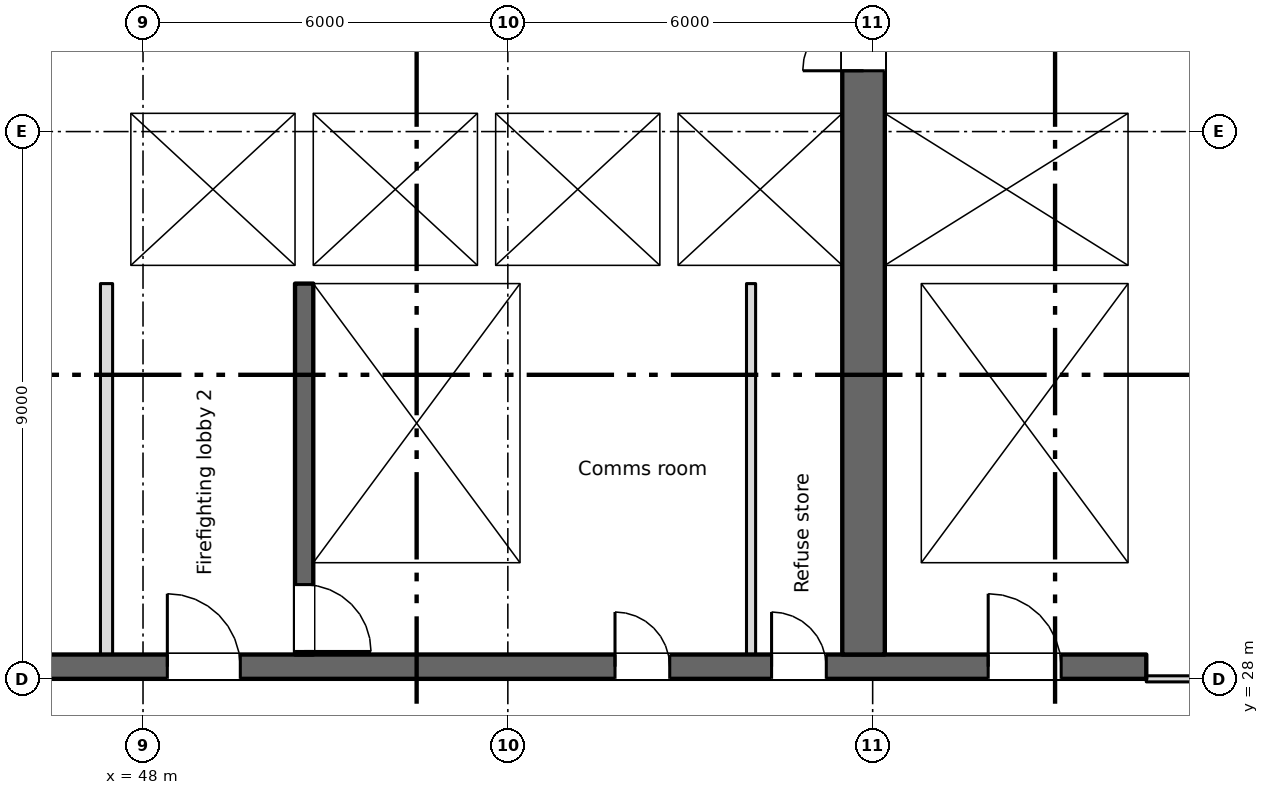
"""IFC4 building model, lengths in metres.
Left out: names, types, materials, properties, quantities, classifications, styles, units other than length and angle.
Written with IfcOpenShell. Run it as: python <this file> out.ifc"""

import sys

from ifc_helpers import new_model, si_unit, direction, frame, frame_2d, origin, place, context, subcontext, project, spatial, rectangle, extrude, element, fill, save


model = new_model("IFC4")
c1 = context("Model", 3, precision=1e-05, world=origin(), true_north=direction((0.0, 1.0)))
c2 = subcontext(c1, "Body", "Model", "MODEL_VIEW")
j1 = project(units=[si_unit("LENGTHUNIT", "METRE"), si_unit("PLANEANGLEUNIT", "RADIAN")], contexts=[c1])
p1 = place(None, origin())
s1 = spatial("IfcSite", under=j1, at=p1, CompositionType="ELEMENT")
p2 = place(p1, origin())
s2 = spatial("IfcBuilding", under=s1, at=p2, CompositionType="ELEMENT")
p3 = place(p2, frame((0.0, 0.0, 170.5)))
s3 = spatial("IfcBuildingStorey", under=s2, at=p3, CompositionType="ELEMENT", Elevation=170.5)
p4 = place(p3, frame((6.6, 28.2, 0.0), z_axis=(0.0, 0.0, 1.0), x_axis=(1.0, 0.0, 0.0)))
e1 = element("IfcWall", 1, at=p4, inside=s3, PredefinedType="SHEAR", context=c2, shape_type="SweptSolid", body=[
    extrude(rectangle(XDim=57.9, YDim=0.4, at=frame_2d((28.95, 0.0))), origin(), (0.0, 0.0, 1.0), 3.35),
])
p5 = place(p4, frame((12.163, 0.0, 0.0)))
e2 = element("IfcOpeningElement", 2, at=p5, cuts=e1, PredefinedType="OPENING", context=c2, shape_type="SweptSolid", body=[
    extrude(rectangle(XDim=0.9, YDim=2.1, at=frame_2d((0.45, 1.05))), frame((0.0, 0.21, 0.0), z_axis=(0.0, -1.0, 0.0), x_axis=(1.0, 0.0, 0.0)), (0.0, 0.0, 1.0), 0.42),
])
p6 = place(p4, frame((14.738, 0.0, 0.0)))
e3 = element("IfcOpeningElement", 3, at=p6, cuts=e1, PredefinedType="OPENING", context=c2, shape_type="SweptSolid", body=[
    extrude(rectangle(XDim=0.9, YDim=2.1, at=frame_2d((0.45, 1.05))), frame((0.0, 0.21, 0.0), z_axis=(0.0, -1.0, 0.0), x_axis=(1.0, 0.0, 0.0)), (0.0, 0.0, 1.0), 0.42),
])
p7 = place(p4, frame((49.163, 0.0, 0.0)))
e4 = element("IfcOpeningElement", 4, at=p7, cuts=e1, PredefinedType="OPENING", context=c2, shape_type="SweptSolid", body=[
    extrude(rectangle(XDim=0.9, YDim=2.1, at=frame_2d((0.45, 1.05))), frame((0.0, 0.21, 0.0), z_axis=(0.0, -1.0, 0.0), x_axis=(1.0, 0.0, 0.0)), (0.0, 0.0, 1.0), 0.42),
])
p8 = place(p4, frame((51.738, 0.0, 0.0)))
e5 = element("IfcOpeningElement", 5, at=p8, cuts=e1, PredefinedType="OPENING", context=c2, shape_type="SweptSolid", body=[
    extrude(rectangle(XDim=0.9, YDim=2.1, at=frame_2d((0.45, 1.05))), frame((0.0, 0.21, 0.0), z_axis=(0.0, -1.0, 0.0), x_axis=(1.0, 0.0, 0.0)), (0.0, 0.0, 1.0), 0.42),
])
p9 = place(p4, frame((1.45, 0.0, 0.0)))
e6 = element("IfcOpeningElement", 6, at=p9, cuts=e1, PredefinedType="OPENING", context=c2, shape_type="SweptSolid", body=[
    extrude(rectangle(XDim=0.9, YDim=2.1, at=frame_2d((0.45, 1.05))), frame((0.0, 0.21, 0.0), z_axis=(0.0, -1.0, 0.0), x_axis=(1.0, 0.0, 0.0)), (0.0, 0.0, 1.0), 0.42),
])
p10 = place(p4, frame((4.8, 0.0, 0.0)))
e7 = element("IfcOpeningElement", 7, at=p10, cuts=e1, PredefinedType="OPENING", context=c2, shape_type="SweptSolid", body=[
    extrude(rectangle(XDim=1.2, YDim=2.1, at=frame_2d((0.6, 1.05))), frame((0.0, 0.21, 0.0), z_axis=(0.0, -1.0, 0.0), x_axis=(1.0, 0.0, 0.0)), (0.0, 0.0, 1.0), 0.42),
])
p11 = place(p4, frame((31.8, 0.0, 0.0)))
e8 = element("IfcOpeningElement", 8, at=p11, cuts=e1, PredefinedType="OPENING", context=c2, shape_type="SweptSolid", body=[
    extrude(rectangle(XDim=1.2, YDim=2.1, at=frame_2d((0.6, 1.05))), frame((0.0, 0.21, 0.0), z_axis=(0.0, -1.0, 0.0), x_axis=(1.0, 0.0, 0.0)), (0.0, 0.0, 1.0), 0.42),
])
p12 = place(p4, frame((55.3, 0.0, 0.0)))
e9 = element("IfcOpeningElement", 9, at=p12, cuts=e1, PredefinedType="OPENING", context=c2, shape_type="SweptSolid", body=[
    extrude(rectangle(XDim=1.2, YDim=2.1, at=frame_2d((0.6, 1.05))), frame((0.0, 0.21, 0.0), z_axis=(0.0, -1.0, 0.0), x_axis=(1.0, 0.0, 0.0)), (0.0, 0.0, 1.0), 0.42),
])
p13 = place(p4, frame((21.8, 0.0, 0.0)))
e10 = element("IfcOpeningElement", 10, at=p13, cuts=e1, PredefinedType="OPENING", context=c2, shape_type="SweptSolid", body=[
    extrude(rectangle(XDim=1.2, YDim=2.1, at=frame_2d((0.6, 1.05))), frame((0.0, 0.21, 0.0), z_axis=(0.0, -1.0, 0.0), x_axis=(1.0, 0.0, 0.0)), (0.0, 0.0, 1.0), 0.42),
])
p14 = place(p4, frame((41.8, 0.0, 0.0)))
e11 = element("IfcOpeningElement", 11, at=p14, cuts=e1, PredefinedType="OPENING", context=c2, shape_type="SweptSolid", body=[
    extrude(rectangle(XDim=1.2, YDim=2.1, at=frame_2d((0.6, 1.05))), frame((0.0, 0.21, 0.0), z_axis=(0.0, -1.0, 0.0), x_axis=(1.0, 0.0, 0.0)), (0.0, 0.0, 1.0), 0.42),
])
p15 = place(p4, frame((24.95, 0.0, 0.0)))
e12 = element("IfcOpeningElement", 12, at=p15, cuts=e1, PredefinedType="OPENING", context=c2, shape_type="SweptSolid", body=[
    extrude(rectangle(XDim=2.4, YDim=2.1, at=frame_2d((1.2, 1.05))), frame((0.0, 0.21, 0.0), z_axis=(0.0, -1.0, 0.0), x_axis=(1.0, 0.0, 0.0)), (0.0, 0.0, 1.0), 0.42),
])
p16 = place(p4, frame((37.45, 0.0, 0.0)))
e13 = element("IfcOpeningElement", 13, at=p16, cuts=e1, PredefinedType="OPENING", context=c2, shape_type="SweptSolid", body=[
    extrude(rectangle(XDim=2.4, YDim=2.1, at=frame_2d((1.2, 1.05))), frame((0.0, 0.21, 0.0), z_axis=(0.0, -1.0, 0.0), x_axis=(1.0, 0.0, 0.0)), (0.0, 0.0, 1.0), 0.42),
])
p17 = place(p4, frame((8.1, 0.0, 0.0)))
e14 = element("IfcOpeningElement", 14, at=p17, cuts=e1, PredefinedType="OPENING", context=c2, shape_type="SweptSolid", body=[
    extrude(rectangle(XDim=2.4, YDim=2.1, at=frame_2d((1.2, 1.05))), frame((0.0, 0.21, 0.0), z_axis=(0.0, -1.0, 0.0), x_axis=(1.0, 0.0, 0.0)), (0.0, 0.0, 1.0), 0.42),
])
p18 = place(p4, frame((28.95, 0.0, 0.0)))
e15 = element("IfcOpeningElement", 15, at=p18, cuts=e1, PredefinedType="OPENING", context=c2, shape_type="SweptSolid", body=[
    extrude(rectangle(XDim=0.9, YDim=2.1, at=frame_2d((0.45, 1.05))), frame((0.0, 0.21, 0.0), z_axis=(0.0, -1.0, 0.0), x_axis=(1.0, 0.0, 0.0)), (0.0, 0.0, 1.0), 0.42),
])
p19 = place(p4, frame((34.95, 0.0, 0.0)))
e16 = element("IfcOpeningElement", 16, at=p19, cuts=e1, PredefinedType="OPENING", context=c2, shape_type="SweptSolid", body=[
    extrude(rectangle(XDim=0.9, YDim=2.1, at=frame_2d((0.45, 1.05))), frame((0.0, 0.21, 0.0), z_axis=(0.0, -1.0, 0.0), x_axis=(1.0, 0.0, 0.0)), (0.0, 0.0, 1.0), 0.42),
])
p20 = place(p3, frame((64.35, 34.8, 0.0), z_axis=(0.0, 0.0, 1.0), x_axis=(0.0, 1.0, 0.0)))
e17 = element("IfcWall", 17, at=p20, inside=s3, PredefinedType="SHEAR", context=c2, shape_type="SweptSolid", body=[
    extrude(rectangle(XDim=10.5, YDim=0.3, at=frame_2d((5.25, 0.0))), origin(), (0.0, 0.0, 1.0), 3.35),
])
p21 = place(p3, frame((59.85, 28.4, 0.0), z_axis=(0.0, 0.0, 1.0), x_axis=(0.0, 1.0, 0.0)))
e18 = element("IfcWall", 18, at=p21, inside=s3, PredefinedType="SHEAR", context=c2, shape_type="SweptSolid", body=[
    extrude(rectangle(XDim=16.9, YDim=0.7, at=frame_2d((8.45, 0.0))), origin(), (0.0, 0.0, 1.0), 3.35),
])
p22 = place(p21, frame((9.6, 0.0, 0.0)))
e19 = element("IfcOpeningElement", 19, at=p22, cuts=e18, PredefinedType="OPENING", context=c2, shape_type="SweptSolid", body=[
    extrude(rectangle(XDim=2.0, YDim=2.1, at=frame_2d((1.0, 1.05))), frame((0.0, 0.36, 0.0), z_axis=(0.0, -1.0, 0.0), x_axis=(1.0, 0.0, 0.0)), (0.0, 0.0, 1.0), 0.72),
])
p23 = place(p21, frame((15.4, 0.0, 0.0)))
e20 = element("IfcOpeningElement", 20, at=p23, cuts=e18, PredefinedType="OPENING", context=c2, shape_type="SweptSolid", body=[
    extrude(rectangle(XDim=1.2, YDim=2.1, at=frame_2d((0.6, 1.05))), frame((0.0, 0.36, 0.0), z_axis=(0.0, -1.0, 0.0), x_axis=(1.0, 0.0, 0.0)), (0.0, 0.0, 1.0), 0.72),
])
p24 = place(p3, frame((50.65, 34.5, 0.0), z_axis=(0.0, 0.0, 1.0), x_axis=(0.0, -1.0, 0.0)))
e21 = element("IfcWall", 21, at=p24, inside=s3, PredefinedType="SHEAR", context=c2, shape_type="SweptSolid", body=[
    extrude(rectangle(XDim=6.1, YDim=0.3, at=frame_2d((3.05, 0.0))), origin(), (0.0, 0.0, 1.0), 3.35),
])
p25 = place(p24, frame((4.95, 0.0, 0.0)))
e22 = element("IfcOpeningElement", 22, at=p25, cuts=e21, PredefinedType="OPENING", context=c2, shape_type="SweptSolid", body=[
    extrude(rectangle(XDim=1.1, YDim=2.1, at=frame_2d((0.55, 1.05))), frame((0.0, 0.16, 0.0), z_axis=(0.0, -1.0, 0.0), x_axis=(1.0, 0.0, 0.0)), (0.0, 0.0, 1.0), 0.32),
])
p26 = place(p3, frame((54.35, 28.4, 0.0), z_axis=(0.0, 0.0, 1.0), x_axis=(0.0, 1.0, 0.0)))
e23 = element("IfcWall", 23, at=p26, inside=s3, PredefinedType="SHEAR", context=c2, shape_type="SweptSolid", body=[
    extrude(rectangle(XDim=6.1, YDim=0.3, at=frame_2d((3.05, 0.0))), origin(), (0.0, 0.0, 1.0), 3.35),
])
p27 = place(p3, frame((60.5, 28.4, 0.0), z_axis=(0.0, 0.0, 1.0), x_axis=(0.0, 1.0, 0.0)))
e24 = element("IfcWall", 24, at=p27, inside=s3, PredefinedType="SHEAR", context=c2, shape_type="SweptSolid", body=[
    extrude(rectangle(XDim=6.1, YDim=0.6, at=frame_2d((3.05, 0.0))), origin(), (0.0, 0.0, 1.0), 3.35),
])
p28 = place(p3, frame((64.35, 28.4, 0.0), z_axis=(0.0, 0.0, 1.0), x_axis=(0.0, 1.0, 0.0)))
e25 = element("IfcWall", 25, at=p28, inside=s3, PredefinedType="SHEAR", context=c2, shape_type="SweptSolid", body=[
    extrude(rectangle(XDim=6.1, YDim=0.3, at=frame_2d((3.05, 0.0))), origin(), (0.0, 0.0, 1.0), 3.35),
])
p29 = place(p3, frame((47.3, 34.65, 0.0), z_axis=(0.0, 0.0, 1.0), x_axis=(1.0, 0.0, 0.0)))
e26 = element("IfcWall", 26, at=p29, inside=s3, PredefinedType="SHEAR", context=c2, shape_type="SweptSolid", body=[
    extrude(rectangle(XDim=12.2, YDim=0.3, at=frame_2d((6.1, 0.0))), origin(), (0.0, 0.0, 1.0), 3.35),
])
p30 = place(p29, frame((1.3, 0.0, 0.0)))
e27 = element("IfcOpeningElement", 27, at=p30, cuts=e26, PredefinedType="OPENING", context=c2, shape_type="SweptSolid", body=[
    extrude(rectangle(XDim=1.1, YDim=2.1, at=frame_2d((0.55, 1.05))), frame((0.0, 0.16, 0.0), z_axis=(0.0, -1.0, 0.0), x_axis=(1.0, 0.0, 0.0)), (0.0, 0.0, 1.0), 0.32),
])
p31 = place(p3, frame((60.2, 34.65, 0.0), z_axis=(0.0, 0.0, 1.0), x_axis=(1.0, 0.0, 0.0)))
e28 = element("IfcWall", 28, at=p31, inside=s3, PredefinedType="SHEAR", context=c2, shape_type="SweptSolid", body=[
    extrude(rectangle(XDim=4.3, YDim=0.3, at=frame_2d((2.15, 0.0))), origin(), (0.0, 0.0, 1.0), 3.35),
])
p32 = place(p3, frame((47.3, 37.45, 0.0), z_axis=(0.0, 0.0, 1.0), x_axis=(1.0, 0.0, 0.0)))
e29 = element("IfcWall", 29, at=p32, inside=s3, PredefinedType="SHEAR", context=c2, shape_type="SweptSolid", body=[
    extrude(rectangle(XDim=12.2, YDim=0.3, at=frame_2d((6.1, 0.0))), origin(), (0.0, 0.0, 1.0), 3.35),
])
p33 = place(p32, frame((4.3, 0.0, 0.0)))
e30 = element("IfcOpeningElement", 30, at=p33, cuts=e29, PredefinedType="OPENING", context=c2, shape_type="SweptSolid", body=[
    extrude(rectangle(XDim=1.1, YDim=2.1, at=frame_2d((0.55, 1.05))), frame((0.0, 0.16, 0.0), z_axis=(0.0, -1.0, 0.0), x_axis=(1.0, 0.0, 0.0)), (0.0, 0.0, 1.0), 0.32),
])
p34 = place(p32, frame((7.3, 0.0, 0.0)))
e31 = element("IfcOpeningElement", 31, at=p34, cuts=e29, PredefinedType="OPENING", context=c2, shape_type="SweptSolid", body=[
    extrude(rectangle(XDim=1.1, YDim=2.1, at=frame_2d((0.55, 1.05))), frame((0.0, 0.16, 0.0), z_axis=(0.0, -1.0, 0.0), x_axis=(1.0, 0.0, 0.0)), (0.0, 0.0, 1.0), 0.32),
])
p35 = place(p32, frame((10.3, 0.0, 0.0)))
e32 = element("IfcOpeningElement", 32, at=p35, cuts=e29, PredefinedType="OPENING", context=c2, shape_type="SweptSolid", body=[
    extrude(rectangle(XDim=1.1, YDim=2.1, at=frame_2d((0.55, 1.05))), frame((0.0, 0.16, 0.0), z_axis=(0.0, -1.0, 0.0), x_axis=(1.0, 0.0, 0.0)), (0.0, 0.0, 1.0), 0.32),
])
p36 = place(p3, frame((60.2, 37.45, 0.0), z_axis=(0.0, 0.0, 1.0), x_axis=(1.0, 0.0, 0.0)))
e33 = element("IfcWall", 33, at=p36, inside=s3, PredefinedType="SHEAR", context=c2, shape_type="SweptSolid", body=[
    extrude(rectangle(XDim=4.0, YDim=0.3, at=frame_2d((2.0, 0.0))), origin(), (0.0, 0.0, 1.0), 3.35),
])
p37 = place(p36, frame((1.45, 0.0, 0.0)))
e34 = element("IfcOpeningElement", 34, at=p37, cuts=e33, PredefinedType="OPENING", context=c2, shape_type="SweptSolid", body=[
    extrude(rectangle(XDim=1.1, YDim=2.1, at=frame_2d((0.55, 1.05))), frame((0.0, 0.16, 0.0), z_axis=(0.0, -1.0, 0.0), x_axis=(1.0, 0.0, 0.0)), (0.0, 0.0, 1.0), 0.32),
])
p38 = place(p3, frame((47.55, 34.8, 0.0), z_axis=(0.0, 0.0, 1.0), x_axis=(0.0, 1.0, 0.0)))
e35 = element("IfcWall", 35, at=p38, inside=s3, PredefinedType="SHEAR", context=c2, shape_type="SweptSolid", body=[
    extrude(rectangle(XDim=2.5, YDim=0.5, at=frame_2d((1.25, 0.0))), origin(), (0.0, 0.0, 1.0), 3.35),
])
for number, where, z_axis, x_axis in (
    (36, (50.65, 34.8, 0.0), (0.0, 0.0, 1.0), (0.0, 1.0, 0.0)),
    (37, (53.65, 34.8, 0.0), (0.0, 0.0, 1.0), (0.0, 1.0, 0.0)),
    (38, (56.65, 34.8, 0.0), (0.0, 0.0, 1.0), (0.0, 1.0, 0.0)),
):
    element("IfcWall", number, at=place(p3, frame(where, z_axis=z_axis, x_axis=x_axis)), inside=s3, PredefinedType="SHEAR", context=c2, shape_type="SweptSolid", body=[
        extrude(rectangle(XDim=2.5, YDim=0.3, at=frame_2d((1.25, 0.0))), origin(), (0.0, 0.0, 1.0), 3.35),
    ])
p39 = place(p3, frame((47.4, 28.4, 0.0), z_axis=(0.0, 0.0, 1.0), x_axis=(0.0, 1.0, 0.0)))
e39 = element("IfcWall", 39, at=p39, inside=s3, PredefinedType="PARTITIONING", context=c2, shape_type="SweptSolid", body=[
    extrude(rectangle(XDim=6.1, YDim=0.2, at=frame_2d((3.05, 0.0))), origin(), (0.0, 0.0, 1.0), 3.35),
])
p40 = place(p3, frame((58.0, 28.4, 0.0), z_axis=(0.0, 0.0, 1.0), x_axis=(0.0, 1.0, 0.0)))
e40 = element("IfcWall", 40, at=p40, inside=s3, PredefinedType="PARTITIONING", context=c2, shape_type="SweptSolid", body=[
    extrude(rectangle(XDim=6.1, YDim=0.15, at=frame_2d((3.05, 0.0))), origin(), (0.0, 0.0, 1.0), 3.35),
])
p41 = place(p3, frame((64.5, 28.0, 0.0), z_axis=(0.0, 0.0, 1.0), x_axis=(1.0, 0.0, 0.0)))
e41 = element("IfcWall", 41, at=p41, inside=s3, PredefinedType="PARTITIONING", context=c2, shape_type="SweptSolid", body=[
    extrude(rectangle(XDim=6.9, YDim=0.1, at=frame_2d((3.45, 0.0))), origin(), (0.0, 0.0, 1.0), 3.35),
])
p42 = place(p41, frame((2.55, 0.0, 0.0)))
e42 = element("IfcOpeningElement", 42, at=p42, cuts=e41, PredefinedType="OPENING", context=c2, shape_type="SweptSolid", body=[
    extrude(rectangle(XDim=1.8, YDim=2.1, at=frame_2d((0.9, 1.05))), frame((0.0, 0.06, 0.0), z_axis=(0.0, -1.0, 0.0), x_axis=(1.0, 0.0, 0.0)), (0.0, 0.0, 1.0), 0.12),
])
p43 = place(p7, origin())
e43 = element("IfcDoor", 43, at=p43, inside=s3, OperationType="SINGLE_SWING_LEFT", PredefinedType="DOOR", context=c2, shape_type="SweptSolid", body=[
    extrude(rectangle(XDim=0.9, YDim=2.1, at=frame_2d((0.45, 1.05))), frame((0.0, 0.025, 0.0), z_axis=(0.0, -1.0, 0.0), x_axis=(1.0, 0.0, 0.0)), (0.0, 0.0, 1.0), 0.05),
])
fill(e4, e43)
p44 = place(p8, origin())
e44 = element("IfcDoor", 44, at=p44, inside=s3, OperationType="SINGLE_SWING_LEFT", PredefinedType="DOOR", context=c2, shape_type="SweptSolid", body=[
    extrude(rectangle(XDim=0.9, YDim=2.1, at=frame_2d((0.45, 1.05))), frame((0.0, 0.025, 0.0), z_axis=(0.0, -1.0, 0.0), x_axis=(1.0, 0.0, 0.0)), (0.0, 0.0, 1.0), 0.05),
])
fill(e5, e44)
p45 = place(p33, origin())
e45 = element("IfcDoor", 45, at=p45, inside=s3, OperationType="SLIDING_TO_LEFT", PredefinedType="DOOR", context=c2, shape_type="SweptSolid", body=[
    extrude(rectangle(XDim=1.1, YDim=2.1, at=frame_2d((0.55, 1.05))), frame((0.0, 0.025, 0.0), z_axis=(0.0, -1.0, 0.0), x_axis=(1.0, 0.0, 0.0)), (0.0, 0.0, 1.0), 0.05),
])
fill(e30, e45)
p46 = place(p34, origin())
e46 = element("IfcDoor", 46, at=p46, inside=s3, OperationType="SLIDING_TO_LEFT", PredefinedType="DOOR", context=c2, shape_type="SweptSolid", body=[
    extrude(rectangle(XDim=1.1, YDim=2.1, at=frame_2d((0.55, 1.05))), frame((0.0, 0.025, 0.0), z_axis=(0.0, -1.0, 0.0), x_axis=(1.0, 0.0, 0.0)), (0.0, 0.0, 1.0), 0.05),
])
fill(e31, e46)
p47 = place(p35, origin())
e47 = element("IfcDoor", 47, at=p47, inside=s3, OperationType="SLIDING_TO_LEFT", PredefinedType="DOOR", context=c2, shape_type="SweptSolid", body=[
    extrude(rectangle(XDim=1.1, YDim=2.1, at=frame_2d((0.55, 1.05))), frame((0.0, 0.025, 0.0), z_axis=(0.0, -1.0, 0.0), x_axis=(1.0, 0.0, 0.0)), (0.0, 0.0, 1.0), 0.05),
])
fill(e32, e47)
p48 = place(p37, origin())
e48 = element("IfcDoor", 48, at=p48, inside=s3, OperationType="SLIDING_TO_LEFT", PredefinedType="DOOR", context=c2, shape_type="SweptSolid", body=[
    extrude(rectangle(XDim=1.1, YDim=2.1, at=frame_2d((0.55, 1.05))), frame((0.0, 0.025, 0.0), z_axis=(0.0, -1.0, 0.0), x_axis=(1.0, 0.0, 0.0)), (0.0, 0.0, 1.0), 0.05),
])
fill(e34, e48)
p49 = place(p30, origin())
e49 = element("IfcDoor", 49, at=p49, inside=s3, OperationType="SLIDING_TO_LEFT", PredefinedType="DOOR", context=c2, shape_type="SweptSolid", body=[
    extrude(rectangle(XDim=1.1, YDim=2.1, at=frame_2d((0.55, 1.05))), frame((0.0, 0.025, 0.0), z_axis=(0.0, -1.0, 0.0), x_axis=(1.0, 0.0, 0.0)), (0.0, 0.0, 1.0), 0.05),
])
fill(e27, e49)
p50 = place(p25, origin())
e50 = element("IfcDoor", 50, at=p50, inside=s3, OperationType="SINGLE_SWING_RIGHT", PredefinedType="DOOR", context=c2, shape_type="SweptSolid", body=[
    extrude(rectangle(XDim=1.1, YDim=2.1, at=frame_2d((0.55, 1.05))), frame((0.0, 0.025, 0.0), z_axis=(0.0, -1.0, 0.0), x_axis=(1.0, 0.0, 0.0)), (0.0, 0.0, 1.0), 0.05),
])
fill(e22, e50)
p51 = place(p12, origin())
e51 = element("IfcDoor", 51, at=p51, inside=s3, OperationType="SINGLE_SWING_LEFT", PredefinedType="DOOR", context=c2, shape_type="SweptSolid", body=[
    extrude(rectangle(XDim=1.2, YDim=2.1, at=frame_2d((0.6, 1.05))), frame((0.0, 0.025, 0.0), z_axis=(0.0, -1.0, 0.0), x_axis=(1.0, 0.0, 0.0)), (0.0, 0.0, 1.0), 0.05),
])
fill(e9, e51)
p52 = place(p14, origin())
e52 = element("IfcDoor", 52, at=p52, inside=s3, OperationType="SINGLE_SWING_LEFT", PredefinedType="DOOR", context=c2, shape_type="SweptSolid", body=[
    extrude(rectangle(XDim=1.2, YDim=2.1, at=frame_2d((0.6, 1.05))), frame((0.0, 0.025, 0.0), z_axis=(0.0, -1.0, 0.0), x_axis=(1.0, 0.0, 0.0)), (0.0, 0.0, 1.0), 0.05),
])
fill(e11, e52)
p53 = place(p22, origin())
e53 = element("IfcDoor", 53, at=p53, inside=s3, OperationType="DOUBLE_DOOR_SINGLE_SWING", PredefinedType="DOOR", context=c2, shape_type="SweptSolid", body=[
    extrude(rectangle(XDim=2.0, YDim=2.1, at=frame_2d((1.0, 1.05))), frame((0.0, 0.025, 0.0), z_axis=(0.0, -1.0, 0.0), x_axis=(1.0, 0.0, 0.0)), (0.0, 0.0, 1.0), 0.05),
])
fill(e19, e53)
save(model, sys.argv[1])
